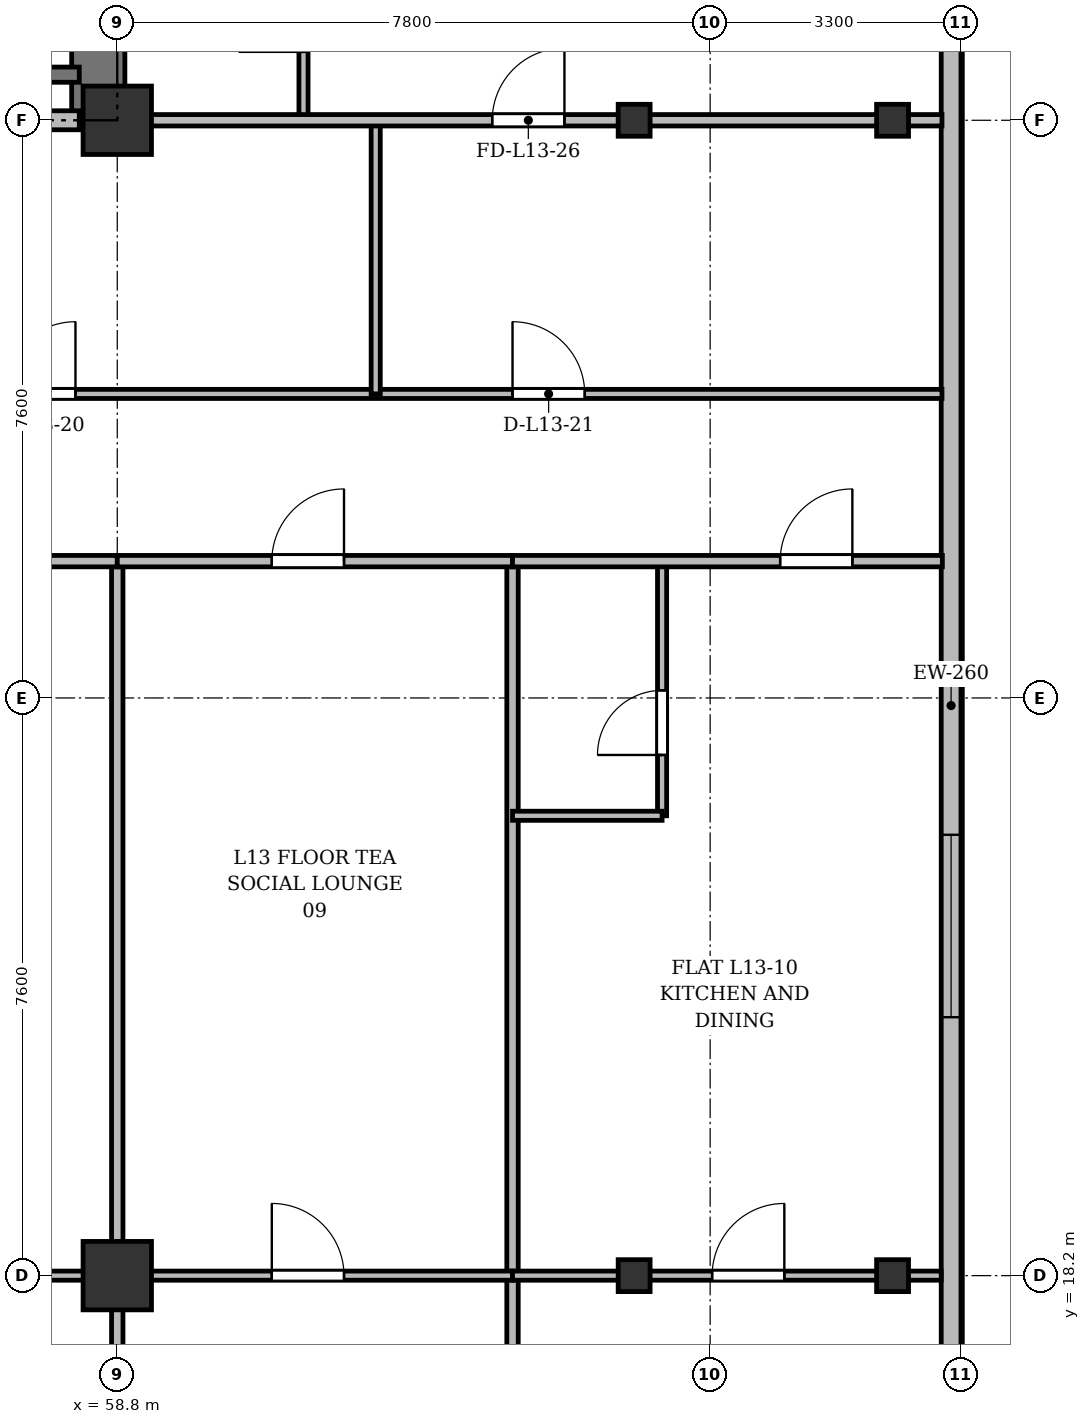
"""IFC4 building model, lengths in metres.
Left out: names, types, materials, properties, quantities, classifications, styles, units other than length and angle.
Written with IfcOpenShell. Run it as: python <this file> out.ifc"""

import sys

from ifc_helpers import new_model, si_unit, direction, frame, frame_2d, origin, origin_2d, place, context, subcontext, project, spatial, rectangle, i_section, extrude, source, transform, mapped, element, fill, save


model = new_model("IFC4")
c1 = context("Model", 3, precision=1e-05, world=origin(), true_north=direction((0.0, 1.0)))
c2 = subcontext(c1, "Body", "Model", "MODEL_VIEW")
j1 = project(units=[si_unit("LENGTHUNIT", "METRE"), si_unit("PLANEANGLEUNIT", "RADIAN")], contexts=[c1])
p1 = place(None, origin())
s1 = spatial("IfcSite", under=j1, at=p1, CompositionType="ELEMENT")
p2 = place(p1, origin())
s2 = spatial("IfcBuilding", under=s1, at=p2, CompositionType="ELEMENT")
p3 = place(p2, frame((0.0, 0.0, 52.3)))
s3 = spatial("IfcBuildingStorey", under=s2, at=p3, CompositionType="ELEMENT", Elevation=52.3)
m1 = source(origin(), c2, "Body", "SweptSolid", [
    extrude(rectangle(XDim=0.9, YDim=0.9, at=origin_2d()), origin(), (0.0, 0.0, 1.0), 3.6),
])
for number, where, z_axis, x_axis in (
    (1, (58.8, 18.2, 0.0), (0.0, 0.0, 1.0), (1.0, 0.0, 0.0)),
    (2, (58.8, 33.4, 0.0), (0.0, 0.0, 1.0), (1.0, 0.0, 0.0)),
):
    element("IfcColumn", number, at=place(p3, frame(where, z_axis=z_axis, x_axis=x_axis)), inside=s3, PredefinedType="COLUMN", context=c2, shape_type="MappedRepresentation", body=[
        mapped(m1, transform((0.0, 0.0, 0.0), x_axis=(1.0, 0.0, 0.0), y_axis=(0.0, 1.0, 0.0), z_axis=(0.0, 0.0, 1.0), scale=1.0)),
    ])
m2 = source(origin(), c2, "Body", "SweptSolid", [
    extrude(i_section(OverallWidth=0.42, OverallDepth=0.42, WebThickness=0.026, FlangeThickness=0.04, at=origin_2d()), origin(), (0.0, 0.0, 1.0), 3.6),
])
for number, where, z_axis, x_axis in (
    (3, (65.6, 18.2, 0.0), (0.0, 0.0, 1.0), (1.0, 0.0, 0.0)),
    (4, (65.6, 33.4, 0.0), (0.0, 0.0, 1.0), (1.0, 0.0, 0.0)),
    (5, (69.0, 18.2, 0.0), (0.0, 0.0, 1.0), (1.0, 0.0, 0.0)),
    (6, (69.0, 33.4, 0.0), (0.0, 0.0, 1.0), (1.0, 0.0, 0.0)),
):
    element("IfcColumn", number, at=place(p3, frame(where, z_axis=z_axis, x_axis=x_axis)), inside=s3, PredefinedType="COLUMN", context=c2, shape_type="MappedRepresentation", body=[
        mapped(m2, transform((0.0, 0.0, 0.0), x_axis=(1.0, 0.0, 0.0), y_axis=(0.0, 1.0, 0.0), z_axis=(0.0, 0.0, 1.0), scale=1.0)),
    ])
p4 = place(p3, frame((69.77, 45.5, 0.0), z_axis=(0.0, 0.0, 1.0), x_axis=(0.0, -1.0, 0.0)))
e7 = element("IfcWall", 7, at=p4, inside=s3, PredefinedType="SOLIDWALL", context=c2, shape_type="SweptSolid", body=[
    extrude(rectangle(XDim=39.6, YDim=0.26, at=frame_2d((19.8, 0.0))), origin(), (0.0, 0.0, 1.0), 3.34),
])
p5 = place(p4, frame((36.95, 0.0, 0.92)))
e8 = element("IfcOpeningElement", 8, at=p5, cuts=e7, PredefinedType="OPENING", context=c2, shape_type="SweptSolid", body=[
    extrude(rectangle(XDim=1.2, YDim=1.65, at=frame_2d((0.6, 0.825))), frame((0.0, 0.14, 0.0), z_axis=(0.0, -1.0, 0.0), x_axis=(1.0, 0.0, 0.0)), (0.0, 0.0, 1.0), 0.28),
])
p6 = place(p4, frame((32.9, 0.0, 0.92)))
e9 = element("IfcOpeningElement", 9, at=p6, cuts=e7, PredefinedType="OPENING", context=c2, shape_type="SweptSolid", body=[
    extrude(rectangle(XDim=2.4, YDim=2.1, at=frame_2d((1.2, 1.05))), frame((0.0, 0.14, 0.0), z_axis=(0.0, -1.0, 0.0), x_axis=(1.0, 0.0, 0.0)), (0.0, 0.0, 1.0), 0.28),
])
p7 = place(p4, frame((28.7, 0.0, 0.92)))
e10 = element("IfcOpeningElement", 10, at=p7, cuts=e7, PredefinedType="OPENING", context=c2, shape_type="SweptSolid", body=[
    extrude(rectangle(XDim=2.4, YDim=2.1, at=frame_2d((1.2, 1.05))), frame((0.0, 0.14, 0.0), z_axis=(0.0, -1.0, 0.0), x_axis=(1.0, 0.0, 0.0)), (0.0, 0.0, 1.0), 0.28),
])
p8 = place(p4, frame((21.5, 0.0, 0.92)))
e11 = element("IfcOpeningElement", 11, at=p8, cuts=e7, PredefinedType="OPENING", context=c2, shape_type="SweptSolid", body=[
    extrude(rectangle(XDim=2.4, YDim=2.1, at=frame_2d((1.2, 1.05))), frame((0.0, 0.14, 0.0), z_axis=(0.0, -1.0, 0.0), x_axis=(1.0, 0.0, 0.0)), (0.0, 0.0, 1.0), 0.28),
])
p9 = place(p4, frame((7.5, 0.0, 0.92)))
e12 = element("IfcOpeningElement", 12, at=p9, cuts=e7, PredefinedType="OPENING", context=c2, shape_type="SweptSolid", body=[
    extrude(rectangle(XDim=2.4, YDim=2.1, at=frame_2d((1.2, 1.05))), frame((0.0, 0.14, 0.0), z_axis=(0.0, -1.0, 0.0), x_axis=(1.0, 0.0, 0.0)), (0.0, 0.0, 1.0), 0.28),
])
p10 = place(p4, frame((4.5, 0.0, 0.92)))
e13 = element("IfcOpeningElement", 13, at=p10, cuts=e7, PredefinedType="OPENING", context=c2, shape_type="SweptSolid", body=[
    extrude(rectangle(XDim=1.2, YDim=1.65, at=frame_2d((0.6, 0.825))), frame((0.0, 0.14, 0.0), z_axis=(0.0, -1.0, 0.0), x_axis=(1.0, 0.0, 0.0)), (0.0, 0.0, 1.0), 0.28),
])
p11 = place(p4, frame((1.15, 0.0, 0.92)))
e14 = element("IfcOpeningElement", 14, at=p11, cuts=e7, PredefinedType="OPENING", context=c2, shape_type="SweptSolid", body=[
    extrude(rectangle(XDim=1.2, YDim=1.65, at=frame_2d((0.6, 0.825))), frame((0.0, 0.14, 0.0), z_axis=(0.0, -1.0, 0.0), x_axis=(1.0, 0.0, 0.0)), (0.0, 0.0, 1.0), 0.28),
])
p12 = place(p3, frame((58.55, 33.4, 0.0), z_axis=(0.0, 0.0, 1.0), x_axis=(0.0, 1.0, 0.0)))
e15 = element("IfcWall", 15, at=p12, inside=s3, PredefinedType="SHEAR", context=c2, shape_type="SweptSolid", body=[
    extrude(rectangle(XDim=11.7, YDim=0.7, at=frame_2d((5.85, 0.0))), origin(), (0.0, 0.0, 1.0), 3.34),
])
p13 = place(p3, frame((54.9, 34.0, 0.0), z_axis=(0.0, 0.0, 1.0), x_axis=(1.0, 0.0, 0.0)))
e16 = element("IfcWall", 16, at=p13, inside=s3, PredefinedType="SHEAR", context=c2, shape_type="SweptSolid", body=[
    extrude(rectangle(XDim=3.4, YDim=0.2, at=frame_2d((1.7, 0.0))), origin(), (0.0, 0.0, 1.0), 3.34),
])
p14 = place(p3, frame((47.15, 33.4, 0.0), z_axis=(0.0, 0.0, 1.0), x_axis=(1.0, 0.0, 0.0)))
e17 = element("IfcWall", 17, at=p14, inside=s3, PredefinedType="PARTITIONING", context=c2, shape_type="SweptSolid", body=[
    extrude(rectangle(XDim=11.15, YDim=0.25, at=frame_2d((5.575, 0.0))), origin(), (0.0, 0.0, 1.0), 2.69),
])
p15 = place(p14, frame((0.7, 0.0, 0.0)))
e18 = element("IfcOpeningElement", 18, at=p15, cuts=e17, PredefinedType="OPENING", context=c2, shape_type="SweptSolid", body=[
    extrude(rectangle(XDim=0.95, YDim=2.15, at=frame_2d((0.475, 1.075))), frame((0.0, 0.135, 0.0), z_axis=(0.0, -1.0, 0.0), x_axis=(1.0, 0.0, 0.0)), (0.0, 0.0, 1.0), 0.27),
])
p16 = place(p14, frame((6.0, 0.0, 0.0)))
e19 = element("IfcOpeningElement", 19, at=p16, cuts=e17, PredefinedType="OPENING", context=c2, shape_type="SweptSolid", body=[
    extrude(rectangle(XDim=1.2, YDim=2.15, at=frame_2d((0.6, 1.075))), frame((0.0, 0.135, 0.0), z_axis=(0.0, -1.0, 0.0), x_axis=(1.0, 0.0, 0.0)), (0.0, 0.0, 1.0), 0.27),
])
p17 = place(p3, frame((54.8, 29.8, 0.0), z_axis=(0.0, 0.0, 1.0), x_axis=(1.0, 0.0, 0.0)))
e20 = element("IfcWall", 20, at=p17, inside=s3, PredefinedType="PARTITIONING", context=c2, shape_type="SweptSolid", body=[
    extrude(rectangle(XDim=14.85, YDim=0.12, at=frame_2d((7.425, 0.0))), origin(), (0.0, 0.0, 1.0), 2.752),
])
p18 = place(p17, frame((2.5, 0.0, 0.0)))
e21 = element("IfcOpeningElement", 21, at=p18, cuts=e20, PredefinedType="OPENING", context=c2, shape_type="SweptSolid", body=[
    extrude(rectangle(XDim=0.95, YDim=2.15, at=frame_2d((0.475, 1.075))), frame((0.0, 0.07, 0.0), z_axis=(0.0, -1.0, 0.0), x_axis=(1.0, 0.0, 0.0)), (0.0, 0.0, 1.0), 0.14),
])
p19 = place(p17, frame((9.2, 0.0, 0.0)))
e22 = element("IfcOpeningElement", 22, at=p19, cuts=e20, PredefinedType="OPENING", context=c2, shape_type="SweptSolid", body=[
    extrude(rectangle(XDim=0.95, YDim=2.15, at=frame_2d((0.475, 1.075))), frame((0.0, 0.07, 0.0), z_axis=(0.0, -1.0, 0.0), x_axis=(1.0, 0.0, 0.0)), (0.0, 0.0, 1.0), 0.14),
])
p20 = place(p3, frame((62.2, 29.8, 0.0), z_axis=(0.0, 0.0, 1.0), x_axis=(0.0, 1.0, 0.0)))
e23 = element("IfcWall", 23, at=p20, inside=s3, PredefinedType="PARTITIONING", context=c2, shape_type="SweptSolid", body=[
    extrude(rectangle(XDim=3.6, YDim=0.12, at=frame_2d((1.8, 0.0))), origin(), (0.0, 0.0, 1.0), 2.69),
])
p21 = place(p3, frame((61.25, 33.4, 0.0), z_axis=(0.0, 0.0, 1.0), x_axis=(0.0, 1.0, 0.0)))
e24 = element("IfcWall", 24, at=p21, inside=s3, PredefinedType="PARTITIONING", context=c2, shape_type="SweptSolid", body=[
    extrude(rectangle(XDim=3.25, YDim=0.12, at=frame_2d((1.625, 0.0))), origin(), (0.0, 0.0, 1.0), 2.69),
])
p22 = place(p21, frame((0.9, 0.0, 0.0)))
e25 = element("IfcOpeningElement", 25, at=p22, cuts=e24, PredefinedType="OPENING", context=c2, shape_type="SweptSolid", body=[
    extrude(rectangle(XDim=0.85, YDim=2.1, at=frame_2d((0.425, 1.05))), frame((0.0, 0.07, 0.0), z_axis=(0.0, -1.0, 0.0), x_axis=(1.0, 0.0, 0.0)), (0.0, 0.0, 1.0), 0.14),
])
p23 = place(p3, frame((58.8, 33.4, 0.0), z_axis=(0.0, 0.0, 1.0), x_axis=(1.0, 0.0, 0.0)))
e26 = element("IfcWall", 26, at=p23, inside=s3, PredefinedType="PARTITIONING", context=c2, shape_type="SweptSolid", body=[
    extrude(rectangle(XDim=10.85, YDim=0.15, at=frame_2d((5.425, 0.0))), origin(), (0.0, 0.0, 1.0), 2.69),
])
p24 = place(p23, frame((4.933, 0.0, 0.0)))
e27 = element("IfcOpeningElement", 27, at=p24, cuts=e26, PredefinedType="OPENING", context=c2, shape_type="SweptSolid", body=[
    extrude(rectangle(XDim=0.95, YDim=2.15, at=frame_2d((0.475, 1.075))), frame((0.0, 0.085, 0.0), z_axis=(0.0, -1.0, 0.0), x_axis=(1.0, 0.0, 0.0)), (0.0, 0.0, 1.0), 0.17),
])
p25 = place(p3, frame((58.8, 3.145, 0.0), z_axis=(0.0, 0.0, 1.0), x_axis=(0.0, 1.0, 0.0)))
e28 = element("IfcWall", 28, at=p25, inside=s3, PredefinedType="PARTITIONING", context=c2, shape_type="SweptSolid", body=[
    extrude(rectangle(XDim=24.455, YDim=0.15, at=frame_2d((12.228, 0.0))), origin(), (0.0, 0.0, 1.0), 2.752),
])
p26 = place(p3, frame((64.0, 3.145, 0.0), z_axis=(0.0, 0.0, 1.0), x_axis=(0.0, 1.0, 0.0)))
e29 = element("IfcWall", 29, at=p26, inside=s3, PredefinedType="PARTITIONING", context=c2, shape_type="SweptSolid", body=[
    extrude(rectangle(XDim=24.455, YDim=0.15, at=frame_2d((12.228, 0.0))), origin(), (0.0, 0.0, 1.0), 2.69),
])
p27 = place(p3, frame((51.0, 27.6, 0.0), z_axis=(0.0, 0.0, 1.0), x_axis=(1.0, 0.0, 0.0)))
e30 = element("IfcWall", 30, at=p27, inside=s3, PredefinedType="PARTITIONING", context=c2, shape_type="SweptSolid", body=[
    extrude(rectangle(XDim=7.8, YDim=0.15, at=frame_2d((3.9, 0.0))), origin(), (0.0, 0.0, 1.0), 2.752),
])
p28 = place(p27, frame((3.333, 0.0, 0.0)))
e31 = element("IfcOpeningElement", 31, at=p28, cuts=e30, PredefinedType="OPENING", context=c2, shape_type="SweptSolid", body=[
    extrude(rectangle(XDim=0.95, YDim=2.15, at=frame_2d((0.475, 1.075))), frame((0.0, 0.085, 0.0), z_axis=(0.0, -1.0, 0.0), x_axis=(1.0, 0.0, 0.0)), (0.0, 0.0, 1.0), 0.17),
])
p29 = place(p3, frame((51.0, 18.2, 0.0), z_axis=(0.0, 0.0, 1.0), x_axis=(1.0, 0.0, 0.0)))
e32 = element("IfcWall", 32, at=p29, inside=s3, PredefinedType="PARTITIONING", context=c2, shape_type="SweptSolid", body=[
    extrude(rectangle(XDim=7.8, YDim=0.12, at=frame_2d((3.9, 0.0))), origin(), (0.0, 0.0, 1.0), 2.69),
])
p30 = place(p29, frame((3.333, 0.0, 0.0)))
e33 = element("IfcOpeningElement", 33, at=p30, cuts=e32, PredefinedType="OPENING", context=c2, shape_type="SweptSolid", body=[
    extrude(rectangle(XDim=0.95, YDim=2.15, at=frame_2d((0.475, 1.075))), frame((0.0, 0.07, 0.0), z_axis=(0.0, -1.0, 0.0), x_axis=(1.0, 0.0, 0.0)), (0.0, 0.0, 1.0), 0.14),
])
p31 = place(p3, frame((58.8, 27.6, 0.0), z_axis=(0.0, 0.0, 1.0), x_axis=(1.0, 0.0, 0.0)))
e34 = element("IfcWall", 34, at=p31, inside=s3, PredefinedType="PARTITIONING", context=c2, shape_type="SweptSolid", body=[
    extrude(rectangle(XDim=5.2, YDim=0.15, at=frame_2d((2.6, 0.0))), origin(), (0.0, 0.0, 1.0), 2.752),
])
p32 = place(p31, frame((2.033, 0.0, 0.0)))
e35 = element("IfcOpeningElement", 35, at=p32, cuts=e34, PredefinedType="OPENING", context=c2, shape_type="SweptSolid", body=[
    extrude(rectangle(XDim=0.95, YDim=2.15, at=frame_2d((0.475, 1.075))), frame((0.0, 0.085, 0.0), z_axis=(0.0, -1.0, 0.0), x_axis=(1.0, 0.0, 0.0)), (0.0, 0.0, 1.0), 0.17),
])
p33 = place(p3, frame((58.8, 18.2, 0.0), z_axis=(0.0, 0.0, 1.0), x_axis=(1.0, 0.0, 0.0)))
e36 = element("IfcWall", 36, at=p33, inside=s3, PredefinedType="PARTITIONING", context=c2, shape_type="SweptSolid", body=[
    extrude(rectangle(XDim=5.2, YDim=0.12, at=frame_2d((2.6, 0.0))), origin(), (0.0, 0.0, 1.0), 2.69),
])
p34 = place(p33, frame((2.033, 0.0, 0.0)))
e37 = element("IfcOpeningElement", 37, at=p34, cuts=e36, PredefinedType="OPENING", context=c2, shape_type="SweptSolid", body=[
    extrude(rectangle(XDim=0.95, YDim=2.15, at=frame_2d((0.475, 1.075))), frame((0.0, 0.07, 0.0), z_axis=(0.0, -1.0, 0.0), x_axis=(1.0, 0.0, 0.0)), (0.0, 0.0, 1.0), 0.14),
])
p35 = place(p3, frame((64.0, 18.2, 0.0), z_axis=(0.0, 0.0, 1.0), x_axis=(1.0, 0.0, 0.0)))
e38 = element("IfcWall", 38, at=p35, inside=s3, PredefinedType="PARTITIONING", context=c2, shape_type="SweptSolid", body=[
    extrude(rectangle(XDim=5.64, YDim=0.12, at=frame_2d((2.82, 0.0))), origin(), (0.0, 0.0, 1.0), 2.69),
])
p36 = place(p35, frame((2.626, 0.0, 0.0)))
e39 = element("IfcOpeningElement", 39, at=p36, cuts=e38, PredefinedType="OPENING", context=c2, shape_type="SweptSolid", body=[
    extrude(rectangle(XDim=0.95, YDim=2.15, at=frame_2d((0.475, 1.075))), frame((0.0, 0.07, 0.0), z_axis=(0.0, -1.0, 0.0), x_axis=(1.0, 0.0, 0.0)), (0.0, 0.0, 1.0), 0.14),
])
p37 = place(p3, frame((65.968, 24.25, 0.0), z_axis=(0.0, 0.0, 1.0), x_axis=(0.0, 1.0, 0.0)))
e40 = element("IfcWall", 40, at=p37, inside=s3, PredefinedType="PARTITIONING", context=c2, shape_type="SweptSolid", body=[
    extrude(rectangle(XDim=3.35, YDim=0.12, at=frame_2d((1.675, 0.0))), origin(), (0.0, 0.0, 1.0), 2.94),
])
p38 = place(p37, frame((0.8, 0.0, 0.0)))
e41 = element("IfcOpeningElement", 41, at=p38, cuts=e40, PredefinedType="OPENING", context=c2, shape_type="SweptSolid", body=[
    extrude(rectangle(XDim=0.85, YDim=2.1, at=frame_2d((0.425, 1.05))), frame((0.0, 0.07, 0.0), z_axis=(0.0, -1.0, 0.0), x_axis=(1.0, 0.0, 0.0)), (0.0, 0.0, 1.0), 0.14),
])
p39 = place(p3, frame((64.0, 24.25, 0.0), z_axis=(0.0, 0.0, 1.0), x_axis=(1.0, 0.0, 0.0)))
e42 = element("IfcWall", 42, at=p39, inside=s3, PredefinedType="PARTITIONING", context=c2, shape_type="SweptSolid", body=[
    extrude(rectangle(XDim=1.968, YDim=0.12, at=frame_2d((0.984, 0.0))), origin(), (0.0, 0.0, 1.0), 2.752),
])
p40 = place(p3, frame((64.0, 27.6, 0.0), z_axis=(0.0, 0.0, 1.0), x_axis=(1.0, 0.0, 0.0)))
e43 = element("IfcWall", 43, at=p40, inside=s3, PredefinedType="PARTITIONING", context=c2, shape_type="SweptSolid", body=[
    extrude(rectangle(XDim=5.655, YDim=0.15, at=frame_2d((2.828, 0.0))), origin(), (0.0, 0.0, 1.0), 2.752),
])
p41 = place(p40, frame((3.521, 0.0, 0.0)))
e44 = element("IfcOpeningElement", 44, at=p41, cuts=e43, PredefinedType="OPENING", context=c2, shape_type="SweptSolid", body=[
    extrude(rectangle(XDim=0.95, YDim=2.15, at=frame_2d((0.475, 1.075))), frame((0.0, 0.085, 0.0), z_axis=(0.0, -1.0, 0.0), x_axis=(1.0, 0.0, 0.0)), (0.0, 0.0, 1.0), 0.17),
])
m3 = source(origin(), c2, "Body", "SweptSolid", [
    extrude(rectangle(XDim=2.4, YDim=2.1, at=frame_2d((1.2, 1.05))), frame((0.0, 0.03, 0.0), z_axis=(0.0, -1.0, 0.0), x_axis=(1.0, 0.0, 0.0)), (0.0, 0.0, 1.0), 0.06),
])
p42 = place(p8, origin())
e45 = element("IfcWindow", 45, at=p42, inside=s3, PartitioningType="SINGLE_PANEL", PredefinedType="WINDOW", context=c2, shape_type="MappedRepresentation", body=[
    mapped(m3, transform((0.0, 0.0, 0.0), x_axis=(1.0, 0.0, 0.0), y_axis=(0.0, 1.0, 0.0), z_axis=(0.0, 0.0, 1.0), scale=1.0)),
])
fill(e11, e45)
m4 = source(origin(), c2, "Body", "SweptSolid", [
    extrude(rectangle(XDim=0.95, YDim=2.15, at=frame_2d((0.475, 1.075))), frame((0.0, 0.025, 0.0), z_axis=(0.0, -1.0, 0.0), x_axis=(1.0, 0.0, 0.0)), (0.0, 0.0, 1.0), 0.05),
])
p43 = place(p18, origin())
e46 = element("IfcDoor", 46, at=p43, inside=s3, OperationType="SINGLE_SWING_RIGHT", PredefinedType="DOOR", context=c2, shape_type="MappedRepresentation", body=[
    mapped(m4, transform((0.0, 0.0, 0.0), x_axis=(1.0, 0.0, 0.0), y_axis=(0.0, 1.0, 0.0), z_axis=(0.0, 0.0, 1.0), scale=1.0)),
])
fill(e21, e46)
p44 = place(p19, origin())
e47 = element("IfcDoor", 47, at=p44, inside=s3, OperationType="SINGLE_SWING_LEFT", PredefinedType="DOOR", context=c2, shape_type="MappedRepresentation", body=[
    mapped(m4, transform((0.0, 0.0, 0.0), x_axis=(1.0, 0.0, 0.0), y_axis=(0.0, 1.0, 0.0), z_axis=(0.0, 0.0, 1.0), scale=1.0)),
])
fill(e22, e47)
m5 = source(origin(), c2, "Body", "SweptSolid", [
    extrude(rectangle(XDim=0.85, YDim=2.1, at=frame_2d((0.425, 1.05))), frame((0.0, 0.025, 0.0), z_axis=(0.0, -1.0, 0.0), x_axis=(1.0, 0.0, 0.0)), (0.0, 0.0, 1.0), 0.05),
])
p45 = place(p22, origin())
e48 = element("IfcDoor", 48, at=p45, inside=s3, OperationType="SINGLE_SWING_LEFT", PredefinedType="DOOR", context=c2, shape_type="MappedRepresentation", body=[
    mapped(m5, transform((0.0, 0.0, 0.0), x_axis=(1.0, 0.0, 0.0), y_axis=(0.0, 1.0, 0.0), z_axis=(0.0, 0.0, 1.0), scale=1.0)),
])
fill(e25, e48)
p46 = place(p24, origin())
e49 = element("IfcDoor", 49, at=p46, inside=s3, OperationType="SINGLE_SWING_RIGHT", PredefinedType="DOOR", context=c2, shape_type="MappedRepresentation", body=[
    mapped(m4, transform((0.0, 0.0, 0.0), x_axis=(1.0, 0.0, 0.0), y_axis=(0.0, 1.0, 0.0), z_axis=(0.0, 0.0, 1.0), scale=1.0)),
])
fill(e27, e49)
p47 = place(p32, origin())
e50 = element("IfcDoor", 50, at=p47, inside=s3, OperationType="SINGLE_SWING_RIGHT", PredefinedType="DOOR", context=c2, shape_type="MappedRepresentation", body=[
    mapped(m4, transform((0.0, 0.0, 0.0), x_axis=(1.0, 0.0, 0.0), y_axis=(0.0, 1.0, 0.0), z_axis=(0.0, 0.0, 1.0), scale=1.0)),
])
fill(e35, e50)
p48 = place(p34, origin())
e51 = element("IfcDoor", 51, at=p48, inside=s3, OperationType="SINGLE_SWING_LEFT", PredefinedType="DOOR", context=c2, shape_type="MappedRepresentation", body=[
    mapped(m4, transform((0.0, 0.0, 0.0), x_axis=(1.0, 0.0, 0.0), y_axis=(0.0, 1.0, 0.0), z_axis=(0.0, 0.0, 1.0), scale=1.0)),
])
fill(e37, e51)
p49 = place(p36, origin())
e52 = element("IfcDoor", 52, at=p49, inside=s3, OperationType="SINGLE_SWING_RIGHT", PredefinedType="DOOR", context=c2, shape_type="MappedRepresentation", body=[
    mapped(m4, transform((0.0, 0.0, 0.0), x_axis=(1.0, 0.0, 0.0), y_axis=(0.0, 1.0, 0.0), z_axis=(0.0, 0.0, 1.0), scale=1.0)),
])
fill(e39, e52)
p50 = place(p38, origin())
e53 = element("IfcDoor", 53, at=p50, inside=s3, OperationType="SINGLE_SWING_LEFT", PredefinedType="DOOR", context=c2, shape_type="MappedRepresentation", body=[
    mapped(m5, transform((0.0, 0.0, 0.0), x_axis=(1.0, 0.0, 0.0), y_axis=(0.0, 1.0, 0.0), z_axis=(0.0, 0.0, 1.0), scale=1.0)),
])
fill(e41, e53)
p51 = place(p41, origin())
e54 = element("IfcDoor", 54, at=p51, inside=s3, OperationType="SINGLE_SWING_RIGHT", PredefinedType="DOOR", context=c2, shape_type="MappedRepresentation", body=[
    mapped(m4, transform((0.0, 0.0, 0.0), x_axis=(1.0, 0.0, 0.0), y_axis=(0.0, 1.0, 0.0), z_axis=(0.0, 0.0, 1.0), scale=1.0)),
])
fill(e44, e54)
save(model, sys.argv[1])
